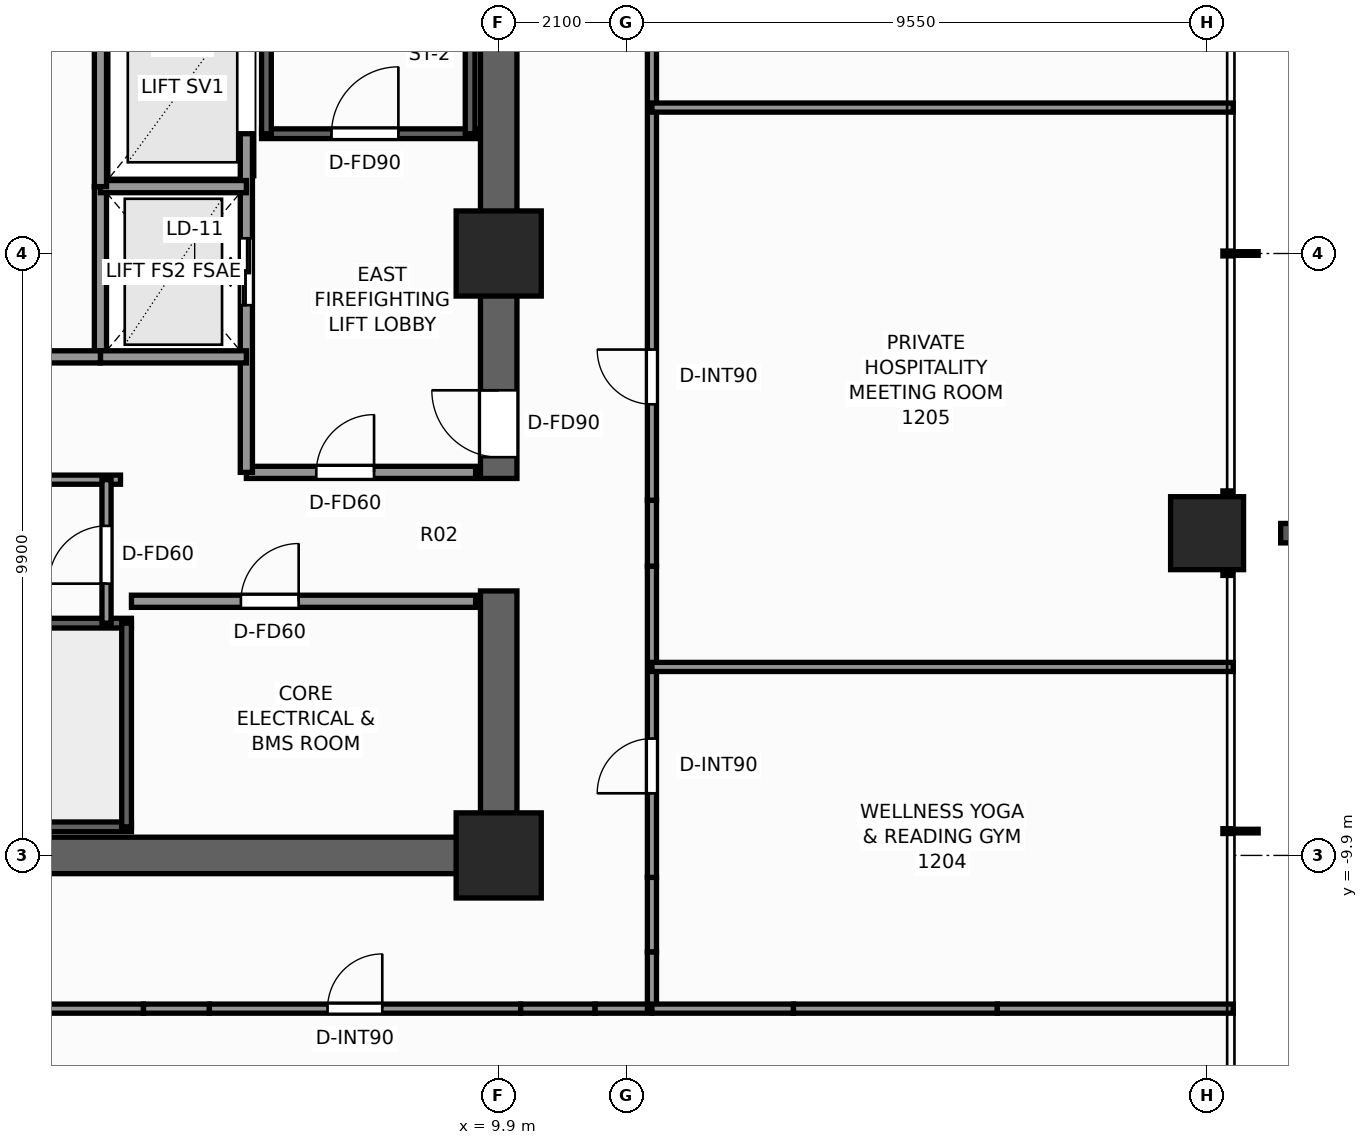
"""IFC4 building model, lengths in metres.
Left out: names, types, materials, properties, quantities, classifications, styles, units other than length and angle.
Written with IfcOpenShell. Run it as: python <this file> out.ifc"""

import sys

from ifc_helpers import new_model, si_unit, direction, frame, frame_2d, origin, origin_2d, place, context, subcontext, project, spatial, rectangle, extrude, element, fill, save


model = new_model("IFC4")
c1 = context("Model", 3, precision=1e-05, world=origin(), true_north=direction((0.0, 1.0)))
c2 = subcontext(c1, "Body", "Model", "MODEL_VIEW")
j1 = project(units=[si_unit("LENGTHUNIT", "METRE"), si_unit("PLANEANGLEUNIT", "RADIAN")], contexts=[c1])
p1 = place(None, origin())
s1 = spatial("IfcSite", under=j1, at=p1, CompositionType="ELEMENT")
p2 = place(p1, origin())
s2 = spatial("IfcBuilding", under=s1, at=p2, CompositionType="ELEMENT")
p3 = place(p2, frame((0.0, 0.0, 43.6)))
s3 = spatial("IfcBuildingStorey", under=s2, at=p3, CompositionType="ELEMENT", Elevation=43.6)
p4 = place(p3, frame((10.2, -9.9, 0.0), z_axis=(0.0, 0.0, 1.0), x_axis=(-1.0, 0.0, 0.0)))
e1 = element("IfcWall", 1, at=p4, inside=s3, PredefinedType="SHEAR", context=c2, shape_type="SweptSolid", body=[
    extrude(rectangle(XDim=12.06, YDim=0.6, at=frame_2d((6.03, 0.0))), origin(), (0.0, 0.0, 1.0), 3.3),
])
p5 = place(p3, frame((9.9, -9.6, 0.0), z_axis=(0.0, 0.0, 1.0), x_axis=(0.0, 1.0, 0.0)))
e2 = element("IfcWall", 2, at=p5, inside=s3, PredefinedType="SHEAR", context=c2, shape_type="SweptSolid", body=[
    extrude(rectangle(XDim=4.05, YDim=0.6, at=frame_2d((2.025, 0.0))), origin(), (0.0, 0.0, 1.0), 3.3),
])
p6 = place(p3, frame((9.9, -3.7, 0.0), z_axis=(0.0, 0.0, 1.0), x_axis=(0.0, 1.0, 0.0)))
e3 = element("IfcWall", 3, at=p6, inside=s3, PredefinedType="SHEAR", context=c2, shape_type="SweptSolid", body=[
    extrude(rectangle(XDim=13.3, YDim=0.6, at=frame_2d((6.65, 0.0))), origin(), (0.0, 0.0, 1.0), 3.3),
])
p7 = place(p6, frame((0.35, 0.0, 0.0)))
e4 = element("IfcOpeningElement", 4, at=p7, cuts=e3, PredefinedType="OPENING", context=c2, shape_type="SweptSolid", body=[
    extrude(rectangle(XDim=1.1, YDim=2.2, at=frame_2d((0.55, 1.1))), frame((0.0, 0.31, 0.0), z_axis=(0.0, -1.0, 0.0), x_axis=(1.0, 0.0, 0.0)), (0.0, 0.0, 1.0), 0.62),
])
for number, where, z_axis, x_axis in (
    (5, (9.9, -9.9, 0.0), (0.0, 0.0, 1.0), (1.0, 0.0, 0.0)),
    (6, (9.9, 0.0, 0.0), (0.0, 0.0, 1.0), (1.0, 0.0, 0.0)),
):
    element("IfcColumn", number, at=place(p3, frame(where, z_axis=z_axis, x_axis=x_axis)), inside=s3, PredefinedType="COLUMN", context=c2, shape_type="SweptSolid", body=[
        extrude(rectangle(XDim=1.4, YDim=1.4, at=origin_2d()), origin(), (0.0, 0.0, 1.0), 3.3),
    ])
p8 = place(p3, frame((21.55, -4.6, 0.0), z_axis=(0.0, 0.0, 1.0), x_axis=(1.0, 0.0, 0.0)))
e7 = element("IfcColumn", 7, at=p8, inside=s3, PredefinedType="COLUMN", context=c2, shape_type="SweptSolid", body=[
    extrude(rectangle(XDim=1.2, YDim=1.2, at=origin_2d()), origin(), (0.0, 0.0, 1.0), 3.3),
])
p9 = place(p3, frame((6.0, 1.97, 0.0), z_axis=(0.0, 0.0, 1.0), x_axis=(1.0, 0.0, 0.0)))
e8 = element("IfcWall", 8, at=p9, inside=s3, PredefinedType="SHEAR", context=c2, shape_type="SweptSolid", body=[
    extrude(rectangle(XDim=3.52, YDim=0.16, at=frame_2d((1.76, 0.0))), origin(), (0.0, 0.0, 1.0), 3.3),
])
p10 = place(p9, frame((1.15, 0.0, 0.0)))
e9 = element("IfcOpeningElement", 9, at=p10, cuts=e8, PredefinedType="OPENING", context=c2, shape_type="SweptSolid", body=[
    extrude(rectangle(XDim=1.1, YDim=2.2, at=frame_2d((0.55, 1.1))), frame((0.0, 0.09, 0.0), z_axis=(0.0, -1.0, 0.0), x_axis=(1.0, 0.0, 0.0)), (0.0, 0.0, 1.0), 0.18),
])
for number, where, z_axis, x_axis in (
    (10, (6.08, 1.97, 0.0), (0.0, 0.0, 1.0), (0.0, 1.0, 0.0)),
    (11, (9.43, 1.97, 0.0), (0.0, 0.0, 1.0), (0.0, 1.0, 0.0)),
):
    element("IfcWall", number, at=place(p3, frame(where, z_axis=z_axis, x_axis=x_axis)), inside=s3, PredefinedType="SHEAR", context=c2, shape_type="SweptSolid", body=[
        extrude(rectangle(XDim=7.56, YDim=0.16, at=frame_2d((3.78, 0.0))), origin(), (0.0, 0.0, 1.0), 3.3),
    ])
p11 = place(p3, frame((3.86, -9.43, 0.0), z_axis=(0.0, 0.0, 1.0), x_axis=(-1.0, 0.0, 0.0)))
e12 = element("IfcWall", 12, at=p11, inside=s3, PredefinedType="SHEAR", context=c2, shape_type="SweptSolid", body=[
    extrude(rectangle(XDim=7.72, YDim=0.16, at=frame_2d((3.86, 0.0))), origin(), (0.0, 0.0, 1.0), 3.3),
])
p12 = place(p11, frame((6.01, 0.0, 0.0)))
e13 = element("IfcOpeningElement", 13, at=p12, cuts=e12, PredefinedType="OPENING", context=c2, shape_type="SweptSolid", body=[
    extrude(rectangle(XDim=1.1, YDim=2.2, at=frame_2d((0.55, 1.1))), frame((0.0, 0.09, 0.0), z_axis=(0.0, -1.0, 0.0), x_axis=(1.0, 0.0, 0.0)), (0.0, 0.0, 1.0), 0.18),
])
p13 = place(p3, frame((-3.86, -6.08, 0.0), z_axis=(0.0, 0.0, 1.0), x_axis=(1.0, 0.0, 0.0)))
e14 = element("IfcWall", 14, at=p13, inside=s3, PredefinedType="SHEAR", context=c2, shape_type="SweptSolid", body=[
    extrude(rectangle(XDim=7.72, YDim=0.16, at=frame_2d((3.86, 0.0))), origin(), (0.0, 0.0, 1.0), 3.3),
])
p14 = place(p3, frame((3.78, -9.43, 0.0), z_axis=(0.0, 0.0, 1.0), x_axis=(0.0, 1.0, 0.0)))
e15 = element("IfcWall", 15, at=p14, inside=s3, PredefinedType="SHEAR", context=c2, shape_type="SweptSolid", body=[
    extrude(rectangle(XDim=3.35, YDim=0.16, at=frame_2d((1.675, 0.0))), origin(), (0.0, 0.0, 1.0), 3.3),
])
p15 = place(p3, frame((5.75, -3.6, 0.0), z_axis=(0.0, 0.0, 1.0), x_axis=(1.0, 0.0, 0.0)))
e16 = element("IfcWall", 16, at=p15, inside=s3, PredefinedType="SOLIDWALL", context=c2, shape_type="SweptSolid", body=[
    extrude(rectangle(XDim=3.77, YDim=0.2, at=frame_2d((1.885, 0.0))), origin(), (0.0, 0.0, 1.0), 3.06),
])
p16 = place(p15, frame((1.15, 0.0, 0.0)))
e17 = element("IfcOpeningElement", 17, at=p16, cuts=e16, PredefinedType="OPENING", context=c2, shape_type="SweptSolid", body=[
    extrude(rectangle(XDim=0.95, YDim=2.06, at=frame_2d((0.475, 1.03))), frame((0.0, 0.11, 0.0), z_axis=(0.0, -1.0, 0.0), x_axis=(1.0, 0.0, 0.0)), (0.0, 0.0, 1.0), 0.22),
])
p17 = place(p3, frame((5.75, -3.6, 0.0), z_axis=(0.0, 0.0, 1.0), x_axis=(0.0, 1.0, 0.0)))
e18 = element("IfcWall", 18, at=p17, inside=s3, PredefinedType="SOLIDWALL", context=c2, shape_type="SweptSolid", body=[
    extrude(rectangle(XDim=5.57, YDim=0.2, at=frame_2d((2.785, 0.0))), origin(), (0.0, 0.0, 1.0), 3.06),
])
p18 = place(p17, frame((2.75, 0.0, 0.0)))
e19 = element("IfcOpeningElement", 19, at=p18, cuts=e18, PredefinedType="OPENING", context=c2, shape_type="SweptSolid", body=[
    extrude(rectangle(XDim=1.1, YDim=2.2, at=frame_2d((0.55, 1.1))), frame((0.0, 0.11, 0.0), z_axis=(0.0, -1.0, 0.0), x_axis=(1.0, 0.0, 0.0)), (0.0, 0.0, 1.0), 0.22),
])
p19 = place(p3, frame((3.35, -1.7, 0.0), z_axis=(0.0, 0.0, 1.0), x_axis=(0.0, 1.0, 0.0)))
e20 = element("IfcWall", 20, at=p19, inside=s3, PredefinedType="SOLIDWALL", context=c2, shape_type="SweptSolid", body=[
    extrude(rectangle(XDim=2.8, YDim=0.2, at=frame_2d((1.4, 0.0))), origin(), (0.0, 0.0, 1.0), 3.06),
])
for number, where, z_axis, x_axis in (
    (21, (3.35, -1.7, 0.0), (0.0, 0.0, 1.0), (1.0, 0.0, 0.0)),
    (22, (3.35, 1.1, 0.0), (0.0, 0.0, 1.0), (1.0, 0.0, 0.0)),
):
    element("IfcWall", number, at=place(p3, frame(where, z_axis=z_axis, x_axis=x_axis)), inside=s3, PredefinedType="SOLIDWALL", context=c2, shape_type="SweptSolid", body=[
        extrude(rectangle(XDim=2.4, YDim=0.2, at=frame_2d((1.2, 0.0))), origin(), (0.0, 0.0, 1.0), 3.06),
    ])
p20 = place(p3, frame((3.86, -5.72, 0.0), z_axis=(0.0, 0.0, 1.0), x_axis=(1.0, 0.0, 0.0)))
e23 = element("IfcWall", 23, at=p20, inside=s3, PredefinedType="SOLIDWALL", context=c2, shape_type="SweptSolid", body=[
    extrude(rectangle(XDim=5.66, YDim=0.2, at=frame_2d((2.83, 0.0))), origin(), (0.0, 0.0, 1.0), 3.06),
])
p21 = place(p20, frame((1.8, 0.0, 0.0)))
e24 = element("IfcOpeningElement", 24, at=p21, cuts=e23, PredefinedType="OPENING", context=c2, shape_type="SweptSolid", body=[
    extrude(rectangle(XDim=0.95, YDim=2.06, at=frame_2d((0.475, 1.03))), frame((0.0, 0.11, 0.0), z_axis=(0.0, -1.0, 0.0), x_axis=(1.0, 0.0, 0.0)), (0.0, 0.0, 1.0), 0.22),
])
p22 = place(p3, frame((-3.35, -1.7, 0.0), z_axis=(0.0, 0.0, 1.0), x_axis=(1.0, 0.0, 0.0)))
e25 = element("IfcWall", 25, at=p22, inside=s3, PredefinedType="SOLIDWALL", context=c2, shape_type="SweptSolid", body=[
    extrude(rectangle(XDim=6.7, YDim=0.2, at=frame_2d((3.35, 0.0))), origin(), (0.0, 0.0, 1.0), 3.06),
])
p23 = place(p3, frame((3.35, 1.1, 0.0), z_axis=(0.0, 0.0, 1.0), x_axis=(0.0, 1.0, 0.0)))
e26 = element("IfcWall", 26, at=p23, inside=s3, PredefinedType="SOLIDWALL", context=c2, shape_type="SweptSolid", body=[
    extrude(rectangle(XDim=3.2, YDim=0.2, at=frame_2d((1.6, 0.0))), origin(), (0.0, 0.0, 1.0), 3.06),
])
p24 = place(p3, frame((-3.68, -3.72, 0.0), z_axis=(0.0, 0.0, 1.0), x_axis=(1.0, 0.0, 0.0)))
e27 = element("IfcWall", 27, at=p24, inside=s3, PredefinedType="PARTITIONING", context=c2, shape_type="SweptSolid", body=[
    extrude(rectangle(XDim=7.36, YDim=0.15, at=frame_2d((3.68, 0.0))), origin(), (0.0, 0.0, 1.0), 3.06),
])
p25 = place(p3, frame((3.45, -6.08, 0.0), z_axis=(0.0, 0.0, 1.0), x_axis=(0.0, 1.0, 0.0)))
e28 = element("IfcWall", 28, at=p25, inside=s3, PredefinedType="PARTITIONING", context=c2, shape_type="SweptSolid", body=[
    extrude(rectangle(XDim=2.36, YDim=0.15, at=frame_2d((1.18, 0.0))), origin(), (0.0, 0.0, 1.0), 3.06),
])
p26 = place(p25, frame((0.65, 0.0, 0.0)))
e29 = element("IfcOpeningElement", 29, at=p26, cuts=e28, PredefinedType="OPENING", context=c2, shape_type="SweptSolid", body=[
    extrude(rectangle(XDim=0.95, YDim=2.06, at=frame_2d((0.475, 1.03))), frame((0.0, 0.085, 0.0), z_axis=(0.0, -1.0, 0.0), x_axis=(1.0, 0.0, 0.0)), (0.0, 0.0, 1.0), 0.17),
])
p27 = place(p3, frame((-4.058, -12.42, 0.0), z_axis=(0.0, 0.0, 1.0), x_axis=(1.0, 0.0, 0.0)))
e30 = element("IfcWall", 30, at=p27, inside=s3, PredefinedType="PARTITIONING", context=c2, shape_type="SweptSolid", body=[
    extrude(rectangle(XDim=8.116, YDim=0.15, at=frame_2d((4.058, 0.0))), origin(), (0.0, 0.0, 1.0), 2.585),
])
p28 = place(p27, frame((1.578, 0.0, 0.0)))
e31 = element("IfcOpeningElement", 31, at=p28, cuts=e30, PredefinedType="OPENING", context=c2, shape_type="SweptSolid", body=[
    extrude(rectangle(XDim=0.9, YDim=2.06, at=frame_2d((0.45, 1.03))), frame((0.0, 0.085, 0.0), z_axis=(0.0, -1.0, 0.0), x_axis=(1.0, 0.0, 0.0)), (0.0, 0.0, 1.0), 0.17),
])
p29 = place(p3, frame((4.058, -12.42, 0.0), z_axis=(0.0, 0.0, 1.0), x_axis=(1.0, 0.0, 0.0)))
e32 = element("IfcWall", 32, at=p29, inside=s3, PredefinedType="PARTITIONING", context=c2, shape_type="SweptSolid", body=[
    extrude(rectangle(XDim=1.084, YDim=0.15, at=frame_2d((0.542, 0.0))), origin(), (0.0, 0.0, 1.0), 1.545),
])
p30 = place(p3, frame((5.142, -12.42, 0.0), z_axis=(0.0, 0.0, 1.0), x_axis=(1.0, 0.0, 0.0)))
e33 = element("IfcWall", 33, at=p30, inside=s3, PredefinedType="PARTITIONING", context=c2, shape_type="SweptSolid", body=[
    extrude(rectangle(XDim=5.119, YDim=0.15, at=frame_2d((2.56, 0.0))), origin(), (0.0, 0.0, 1.0), 3.06),
])
p31 = place(p30, frame((1.943, 0.0, 0.0)))
e34 = element("IfcOpeningElement", 34, at=p31, cuts=e33, PredefinedType="OPENING", context=c2, shape_type="SweptSolid", body=[
    extrude(rectangle(XDim=0.9, YDim=2.06, at=frame_2d((0.45, 1.03))), frame((0.0, 0.085, 0.0), z_axis=(0.0, -1.0, 0.0), x_axis=(1.0, 0.0, 0.0)), (0.0, 0.0, 1.0), 0.17),
])
p32 = place(p3, frame((10.261, -12.42, 0.0), z_axis=(0.0, 0.0, 1.0), x_axis=(1.0, 0.0, 0.0)))
e35 = element("IfcWall", 35, at=p32, inside=s3, PredefinedType="PARTITIONING", context=c2, shape_type="SweptSolid", body=[
    extrude(rectangle(XDim=1.225, YDim=0.15, at=frame_2d((0.612, 0.0))), origin(), (0.0, 0.0, 1.0), 1.545),
])
for number, where, z_axis, x_axis in (
    (36, (11.486, -12.42, 0.0), (0.0, 0.0, 1.0), (1.0, 0.0, 0.0)),
    (37, (12.42, -12.42, 0.0), (0.0, 0.0, 1.0), (0.0, 1.0, 0.0)),
):
    element("IfcWall", number, at=place(p3, frame(where, z_axis=z_axis, x_axis=x_axis)), inside=s3, PredefinedType="PARTITIONING", context=c2, shape_type="SweptSolid", body=[
        extrude(rectangle(XDim=0.934, YDim=0.15, at=frame_2d((0.467, 0.0))), origin(), (0.0, 0.0, 1.0), 3.06),
    ])
p33 = place(p3, frame((12.42, -11.486, 0.0), z_axis=(0.0, 0.0, 1.0), x_axis=(0.0, 1.0, 0.0)))
e38 = element("IfcWall", 38, at=p33, inside=s3, PredefinedType="PARTITIONING", context=c2, shape_type="SweptSolid", body=[
    extrude(rectangle(XDim=1.225, YDim=0.15, at=frame_2d((0.612, 0.0))), origin(), (0.0, 0.0, 1.0), 1.545),
])
p34 = place(p3, frame((12.42, -10.261, 0.0), z_axis=(0.0, 0.0, 1.0), x_axis=(0.0, 1.0, 0.0)))
e39 = element("IfcWall", 39, at=p34, inside=s3, PredefinedType="PARTITIONING", context=c2, shape_type="SweptSolid", body=[
    extrude(rectangle(XDim=5.119, YDim=0.15, at=frame_2d((2.56, 0.0))), origin(), (0.0, 0.0, 1.0), 3.06),
])
p35 = place(p34, frame((1.383, 0.0, 0.0)))
e40 = element("IfcOpeningElement", 40, at=p35, cuts=e39, PredefinedType="OPENING", context=c2, shape_type="SweptSolid", body=[
    extrude(rectangle(XDim=0.9, YDim=2.06, at=frame_2d((0.45, 1.03))), frame((0.0, 0.085, 0.0), z_axis=(0.0, -1.0, 0.0), x_axis=(1.0, 0.0, 0.0)), (0.0, 0.0, 1.0), 0.17),
])
p36 = place(p3, frame((12.42, -5.142, 0.0), z_axis=(0.0, 0.0, 1.0), x_axis=(0.0, 1.0, 0.0)))
e41 = element("IfcWall", 41, at=p36, inside=s3, PredefinedType="PARTITIONING", context=c2, shape_type="SweptSolid", body=[
    extrude(rectangle(XDim=1.084, YDim=0.15, at=frame_2d((0.542, 0.0))), origin(), (0.0, 0.0, 1.0), 1.545),
])
p37 = place(p3, frame((12.42, -4.058, 0.0), z_axis=(0.0, 0.0, 1.0), x_axis=(0.0, 1.0, 0.0)))
e42 = element("IfcWall", 42, at=p37, inside=s3, PredefinedType="PARTITIONING", context=c2, shape_type="SweptSolid", body=[
    extrude(rectangle(XDim=8.116, YDim=0.15, at=frame_2d((4.058, 0.0))), origin(), (0.0, 0.0, 1.0), 2.349),
])
p38 = place(p37, frame((1.578, 0.0, 0.0)))
e43 = element("IfcOpeningElement", 43, at=p38, cuts=e42, PredefinedType="OPENING", context=c2, shape_type="SweptSolid", body=[
    extrude(rectangle(XDim=0.9, YDim=2.06, at=frame_2d((0.45, 1.03))), frame((0.0, 0.085, 0.0), z_axis=(0.0, -1.0, 0.0), x_axis=(1.0, 0.0, 0.0)), (0.0, 0.0, 1.0), 0.17),
])
p39 = place(p3, frame((12.42, -12.42, 0.0), z_axis=(0.0, 0.0, 1.0), x_axis=(1.0, 0.0, 0.0)))
e44 = element("IfcWall", 44, at=p39, inside=s3, PredefinedType="PARTITIONING", context=c2, shape_type="SweptSolid", body=[
    extrude(rectangle(XDim=2.328, YDim=0.15, at=frame_2d((1.164, 0.0))), origin(), (0.0, 0.0, 1.0), 3.06),
])
p40 = place(p3, frame((14.748, -12.42, 0.0), z_axis=(0.0, 0.0, 1.0), x_axis=(1.0, 0.0, 0.0)))
e45 = element("IfcWall", 45, at=p40, inside=s3, PredefinedType="PARTITIONING", context=c2, shape_type="SweptSolid", body=[
    extrude(rectangle(XDim=3.352, YDim=0.15, at=frame_2d((1.676, 0.0))), origin(), (0.0, 0.0, 1.0), 1.545),
])
p41 = place(p3, frame((18.1, -12.42, 0.0), z_axis=(0.0, 0.0, 1.0), x_axis=(1.0, 0.0, 0.0)))
e46 = element("IfcWall", 46, at=p41, inside=s3, PredefinedType="PARTITIONING", context=c2, shape_type="SweptSolid", body=[
    extrude(rectangle(XDim=3.88, YDim=0.15, at=frame_2d((1.94, 0.0))), origin(), (0.0, 0.0, 1.0), 2.429),
])
for number, where, z_axis, x_axis in (
    (47, (12.42, -6.8, 0.0), (0.0, 0.0, 1.0), (1.0, 0.0, 0.0)),
    (48, (12.42, 2.4, 0.0), (0.0, 0.0, 1.0), (1.0, 0.0, 0.0)),
):
    element("IfcWall", number, at=place(p3, frame(where, z_axis=z_axis, x_axis=x_axis)), inside=s3, PredefinedType="PARTITIONING", context=c2, shape_type="SweptSolid", body=[
        extrude(rectangle(XDim=9.56, YDim=0.15, at=frame_2d((4.78, 0.0))), origin(), (0.0, 0.0, 1.0), 2.429),
    ])
p42 = place(p10, origin())
e49 = element("IfcDoor", 49, at=p42, inside=s3, OperationType="SINGLE_SWING_RIGHT", PredefinedType="DOOR", context=c2, shape_type="SweptSolid", body=[
    extrude(rectangle(XDim=1.1, YDim=2.2, at=frame_2d((0.55, 1.1))), frame((0.0, 0.025, 0.0), z_axis=(0.0, -1.0, 0.0), x_axis=(1.0, 0.0, 0.0)), (0.0, 0.0, 1.0), 0.05),
])
fill(e9, e49)
p43 = place(p7, origin())
e50 = element("IfcDoor", 50, at=p43, inside=s3, OperationType="SINGLE_SWING_RIGHT", PredefinedType="DOOR", context=c2, shape_type="SweptSolid", body=[
    extrude(rectangle(XDim=1.1, YDim=2.2, at=frame_2d((0.55, 1.1))), frame((0.0, 0.025, 0.0), z_axis=(0.0, -1.0, 0.0), x_axis=(1.0, 0.0, 0.0)), (0.0, 0.0, 1.0), 0.05),
])
fill(e4, e50)
p44 = place(p18, origin())
e51 = element("IfcDoor", 51, at=p44, inside=s3, OperationType="DOUBLE_DOOR_SLIDING", PredefinedType="DOOR", context=c2, shape_type="SweptSolid", body=[
    extrude(rectangle(XDim=1.1, YDim=2.2, at=frame_2d((0.55, 1.1))), frame((0.0, 0.025, 0.0), z_axis=(0.0, -1.0, 0.0), x_axis=(1.0, 0.0, 0.0)), (0.0, 0.0, 1.0), 0.05),
])
fill(e19, e51)
p45 = place(p21, origin())
e52 = element("IfcDoor", 52, at=p45, inside=s3, OperationType="SINGLE_SWING_RIGHT", PredefinedType="DOOR", context=c2, shape_type="SweptSolid", body=[
    extrude(rectangle(XDim=0.95, YDim=2.06, at=frame_2d((0.475, 1.03))), frame((0.0, 0.025, 0.0), z_axis=(0.0, -1.0, 0.0), x_axis=(1.0, 0.0, 0.0)), (0.0, 0.0, 1.0), 0.05),
])
fill(e24, e52)
p46 = place(p16, origin())
e53 = element("IfcDoor", 53, at=p46, inside=s3, OperationType="SINGLE_SWING_RIGHT", PredefinedType="DOOR", context=c2, shape_type="SweptSolid", body=[
    extrude(rectangle(XDim=0.95, YDim=2.06, at=frame_2d((0.475, 1.03))), frame((0.0, 0.025, 0.0), z_axis=(0.0, -1.0, 0.0), x_axis=(1.0, 0.0, 0.0)), (0.0, 0.0, 1.0), 0.05),
])
fill(e17, e53)
p47 = place(p26, origin())
e54 = element("IfcDoor", 54, at=p47, inside=s3, OperationType="SINGLE_SWING_LEFT", PredefinedType="DOOR", context=c2, shape_type="SweptSolid", body=[
    extrude(rectangle(XDim=0.95, YDim=2.06, at=frame_2d((0.475, 1.03))), frame((0.0, 0.025, 0.0), z_axis=(0.0, -1.0, 0.0), x_axis=(1.0, 0.0, 0.0)), (0.0, 0.0, 1.0), 0.05),
])
fill(e29, e54)
p48 = place(p31, origin())
e55 = element("IfcDoor", 55, at=p48, inside=s3, OperationType="SINGLE_SWING_RIGHT", PredefinedType="DOOR", context=c2, shape_type="SweptSolid", body=[
    extrude(rectangle(XDim=0.9, YDim=2.06, at=frame_2d((0.45, 1.03))), frame((0.0, 0.025, 0.0), z_axis=(0.0, -1.0, 0.0), x_axis=(1.0, 0.0, 0.0)), (0.0, 0.0, 1.0), 0.05),
])
fill(e34, e55)
p49 = place(p35, origin())
e56 = element("IfcDoor", 56, at=p49, inside=s3, OperationType="SINGLE_SWING_LEFT", PredefinedType="DOOR", context=c2, shape_type="SweptSolid", body=[
    extrude(rectangle(XDim=0.9, YDim=2.06, at=frame_2d((0.45, 1.03))), frame((0.0, 0.025, 0.0), z_axis=(0.0, -1.0, 0.0), x_axis=(1.0, 0.0, 0.0)), (0.0, 0.0, 1.0), 0.05),
])
fill(e40, e56)
p50 = place(p38, origin())
e57 = element("IfcDoor", 57, at=p50, inside=s3, OperationType="SINGLE_SWING_RIGHT", PredefinedType="DOOR", context=c2, shape_type="SweptSolid", body=[
    extrude(rectangle(XDim=0.9, YDim=2.06, at=frame_2d((0.45, 1.03))), frame((0.0, 0.025, 0.0), z_axis=(0.0, -1.0, 0.0), x_axis=(1.0, 0.0, 0.0)), (0.0, 0.0, 1.0), 0.05),
])
fill(e43, e57)
save(model, sys.argv[1])
